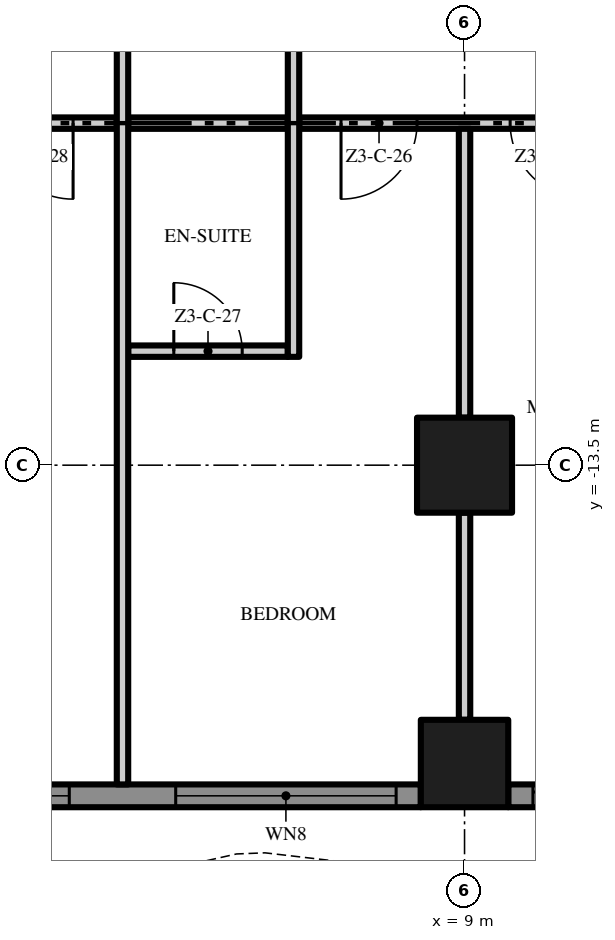
"""IFC4 building model, lengths in metres.
Left out: names, types, materials, properties, quantities, classifications, styles, units other than length and angle.
Written with IfcOpenShell. Run it as: python <this file> out.ifc"""

import sys

from ifc_helpers import new_model, si_unit, direction, frame, frame_2d, origin, origin_2d, place, context, subcontext, project, spatial, polyline, rectangle, outline, extrude, element, fill, save


model = new_model("IFC4")
c1 = context("Model", 3, precision=1e-05, world=origin(), true_north=direction((0.0, 1.0)))
c2 = subcontext(c1, "Body", "Model", "MODEL_VIEW")
j1 = project(units=[si_unit("LENGTHUNIT", "METRE"), si_unit("PLANEANGLEUNIT", "RADIAN")], contexts=[c1])
p1 = place(None, origin())
s1 = spatial("IfcSite", under=j1, at=p1, CompositionType="ELEMENT")
p2 = place(p1, origin())
s2 = spatial("IfcBuilding", under=s1, at=p2, CompositionType="ELEMENT")
p3 = place(p2, frame((0.0, 0.0, 147.8)))
s3 = spatial("IfcBuildingStorey", under=s2, at=p3, CompositionType="ELEMENT", Elevation=147.8)
p4 = place(p3, frame((9.0, -13.5, 0.0), z_axis=(0.0, 0.0, 1.0), x_axis=(1.0, 0.0, 0.0)))
e1 = element("IfcColumn", 1, at=p4, inside=s3, PredefinedType="COLUMN", context=c2, shape_type="SweptSolid", body=[
    extrude(rectangle(XDim=1.25, YDim=1.25, at=origin_2d()), origin(), (0.0, 0.0, 1.0), 3.5),
])
p5 = place(p3, frame((9.0, -17.425, 0.0), z_axis=(0.0, 0.0, 1.0), x_axis=(1.0, 0.0, 0.0)))
e2 = element("IfcColumn", 2, at=p5, inside=s3, PredefinedType="COLUMN", context=c2, shape_type="SweptSolid", body=[
    extrude(rectangle(XDim=1.15, YDim=1.15, at=origin_2d()), origin(), (0.0, 0.0, 1.0), 3.5),
])
p6 = place(p3, frame((8.425, -17.85, 0.0), z_axis=(0.0, 0.0, 1.0), x_axis=(-1.0, 0.0, 0.0)))
e3 = element("IfcWall", 3, at=p6, inside=s3, PredefinedType="SOLIDWALL", context=c2, shape_type="SweptSolid", body=[
    extrude(rectangle(XDim=7.85, YDim=0.3, at=frame_2d((3.925, 0.0))), origin(), (0.0, 0.0, 1.0), 3.5),
])
p7 = place(p6, frame((4.625, 0.0, 0.45)))
e4 = element("IfcOpeningElement", 4, at=p7, cuts=e3, PredefinedType="OPENING", context=c2, shape_type="SweptSolid", body=[
    extrude(rectangle(XDim=2.9, YDim=2.65, at=frame_2d((1.45, 1.325))), frame((0.0, 0.16, 0.0), z_axis=(0.0, -1.0, 0.0), x_axis=(1.0, 0.0, 0.0)), (0.0, 0.0, 1.0), 0.32),
])
p8 = place(p6, frame((0.325, 0.0, 0.45)))
e5 = element("IfcOpeningElement", 5, at=p8, cuts=e3, PredefinedType="OPENING", context=c2, shape_type="SweptSolid", body=[
    extrude(rectangle(XDim=2.9, YDim=2.65, at=frame_2d((1.45, 1.325))), frame((0.0, 0.16, 0.0), z_axis=(0.0, -1.0, 0.0), x_axis=(1.0, 0.0, 0.0)), (0.0, 0.0, 1.0), 0.32),
])
p9 = place(p3, frame((16.85, -17.85, 0.0), z_axis=(0.0, 0.0, 1.0), x_axis=(-1.0, 0.0, 0.0)))
e6 = element("IfcWall", 6, at=p9, inside=s3, PredefinedType="SOLIDWALL", context=c2, shape_type="SweptSolid", body=[
    extrude(rectangle(XDim=7.275, YDim=0.3, at=frame_2d((3.638, 0.0))), origin(), (0.0, 0.0, 1.0), 3.5),
])
p10 = place(p9, frame((4.05, 0.0, 0.0)))
e7 = element("IfcOpeningElement", 7, at=p10, cuts=e6, PredefinedType="OPENING", context=c2, shape_type="SweptSolid", body=[
    extrude(rectangle(XDim=2.9, YDim=2.4, at=frame_2d((1.45, 1.2))), frame((0.0, 0.16, 0.0), z_axis=(0.0, -1.0, 0.0), x_axis=(1.0, 0.0, 0.0)), (0.0, 0.0, 1.0), 0.32),
])
p11 = place(p9, frame((0.3, 0.0, 0.0)))
e8 = element("IfcOpeningElement", 8, at=p11, cuts=e6, PredefinedType="OPENING", context=c2, shape_type="SweptSolid", body=[
    extrude(rectangle(XDim=2.35, YDim=2.4, at=frame_2d((1.175, 1.2))), frame((0.0, 0.16, 0.0), z_axis=(0.0, -1.0, 0.0), x_axis=(1.0, 0.0, 0.0)), (0.0, 0.0, 1.0), 0.32),
])
p12 = place(p3, origin())
e9 = element("IfcWall", 9, at=p12, inside=s3, PredefinedType="USERDEFINED", context=c2, shape_type="SweptSolid", body=[
    extrude(outline(polyline([(-18.0, -20.649), (-16.5, -20.985), (-16.125, -21.0), (-15.0, -20.869), (-13.5, -20.345), (-12.0, -19.612), (-10.5, -18.951), (-9.0, -18.615), (-8.625, -18.6), (-7.5, -18.731), (-6.0, -19.255), (-4.5, -19.988), (-3.0, -20.649), (-1.5, -20.985), (-1.125, -21.0), (0.0, -20.869), (1.5, -20.345), (3.0, -19.612), (4.5, -18.951), (6.0, -18.615), (6.375, -18.6), (7.5, -18.731), (9.0, -19.255), (10.5, -19.988), (12.0, -20.649), (13.5, -20.985), (13.875, -21.0), (15.0, -20.869), (16.5, -20.345), (18.0, -19.612), (17.89, -19.388), (16.404, -20.114), (14.944, -20.624), (13.865, -20.749), (13.533, -20.736), (12.079, -20.41), (10.605, -19.761), (9.096, -19.024), (7.556, -18.486), (6.385, -18.349), (5.967, -18.366), (4.421, -18.713), (2.895, -19.385), (1.404, -20.114), (-0.056, -20.624), (-1.135, -20.749), (-1.467, -20.736), (-2.921, -20.41), (-4.395, -19.761), (-5.904, -19.024), (-7.444, -18.486), (-8.615, -18.349), (-9.033, -18.366), (-10.579, -18.713), (-12.105, -19.385), (-13.596, -20.114), (-15.056, -20.624), (-16.135, -20.749), (-16.467, -20.736), (-17.945, -20.405), (-18.0, -20.649)])), origin(), (0.0, 0.0, 1.0), 0.9),
])
p13 = place(p3, frame((4.575, -12.0, 0.0), z_axis=(0.0, 0.0, 1.0), x_axis=(1.0, 0.0, 0.0)))
e10 = element("IfcWall", 10, at=p13, inside=s3, PredefinedType="PARTITIONING", context=c2, shape_type="SweptSolid", body=[
    extrude(rectangle(XDim=2.1, YDim=0.15, at=frame_2d((1.05, 0.0))), origin(), (0.0, 0.0, 1.0), 3.5),
])
p14 = place(p13, frame((0.6, 0.0, 0.0)))
e11 = element("IfcOpeningElement", 11, at=p14, cuts=e10, PredefinedType="OPENING", context=c2, shape_type="SweptSolid", body=[
    extrude(rectangle(XDim=0.9, YDim=2.1, at=frame_2d((0.45, 1.05))), frame((0.0, 0.085, 0.0), z_axis=(0.0, -1.0, 0.0), x_axis=(1.0, 0.0, 0.0)), (0.0, 0.0, 1.0), 0.17),
])
p15 = place(p3, frame((4.425, -9.0, 0.0), z_axis=(0.0, 0.0, 1.0), x_axis=(-1.0, 0.0, 0.0)))
e12 = element("IfcWall", 12, at=p15, inside=s3, PredefinedType="PARTITIONING", context=c2, shape_type="SweptSolid", body=[
    extrude(rectangle(XDim=4.35, YDim=0.15, at=frame_2d((2.175, 0.0))), origin(), (0.0, 0.0, 1.0), 3.5),
])
p16 = place(p15, frame((0.575, 0.0, 0.0)))
e13 = element("IfcOpeningElement", 13, at=p16, cuts=e12, PredefinedType="OPENING", context=c2, shape_type="SweptSolid", body=[
    extrude(rectangle(XDim=1.0, YDim=2.4, at=frame_2d((0.5, 1.2))), frame((0.0, 0.085, 0.0), z_axis=(0.0, -1.0, 0.0), x_axis=(1.0, 0.0, 0.0)), (0.0, 0.0, 1.0), 0.17),
])
p17 = place(p3, frame((4.575, -9.0, 0.0), z_axis=(0.0, 0.0, 1.0), x_axis=(1.0, 0.0, 0.0)))
e14 = element("IfcWall", 14, at=p17, inside=s3, PredefinedType="PARTITIONING", context=c2, shape_type="SweptSolid", body=[
    extrude(rectangle(XDim=2.1, YDim=0.15, at=frame_2d((1.05, 0.0))), origin(), (0.0, 0.0, 1.0), 3.5),
])
p18 = place(p3, frame((11.175, -9.0, 0.0), z_axis=(0.0, 0.0, 1.0), x_axis=(-1.0, 0.0, 0.0)))
e15 = element("IfcWall", 15, at=p18, inside=s3, PredefinedType="PARTITIONING", context=c2, shape_type="SweptSolid", body=[
    extrude(rectangle(XDim=4.35, YDim=0.15, at=frame_2d((2.175, 0.0))), origin(), (0.0, 0.0, 1.0), 3.5),
])
p19 = place(p18, frame((0.575, 0.0, 0.0)))
e16 = element("IfcOpeningElement", 16, at=p19, cuts=e15, PredefinedType="OPENING", context=c2, shape_type="SweptSolid", body=[
    extrude(rectangle(XDim=1.0, YDim=2.4, at=frame_2d((0.5, 1.2))), frame((0.0, 0.085, 0.0), z_axis=(0.0, -1.0, 0.0), x_axis=(1.0, 0.0, 0.0)), (0.0, 0.0, 1.0), 0.17),
])
p20 = place(p18, frame((2.8, 0.0, 0.0)))
e17 = element("IfcOpeningElement", 17, at=p20, cuts=e15, PredefinedType="OPENING", context=c2, shape_type="SweptSolid", body=[
    extrude(rectangle(XDim=1.0, YDim=2.4, at=frame_2d((0.5, 1.2))), frame((0.0, 0.085, 0.0), z_axis=(0.0, -1.0, 0.0), x_axis=(1.0, 0.0, 0.0)), (0.0, 0.0, 1.0), 0.17),
])
p21 = place(p3, frame((4.5, -17.7, 0.0), z_axis=(0.0, 0.0, 1.0), x_axis=(0.0, 1.0, 0.0)))
e18 = element("IfcWall", 18, at=p21, inside=s3, PredefinedType="PARTITIONING", context=c2, shape_type="SweptSolid", body=[
    extrude(rectangle(XDim=13.275, YDim=0.15, at=frame_2d((6.638, 0.0))), origin(), (0.0, 0.0, 1.0), 3.5),
])
p22 = place(p3, frame((6.75, -12.075, 0.0), z_axis=(0.0, 0.0, 1.0), x_axis=(0.0, 1.0, 0.0)))
e19 = element("IfcWall", 19, at=p22, inside=s3, PredefinedType="PARTITIONING", context=c2, shape_type="SweptSolid", body=[
    extrude(rectangle(XDim=7.65, YDim=0.15, at=frame_2d((3.825, 0.0))), origin(), (0.0, 0.0, 1.0), 3.5),
])
p23 = place(p3, frame((9.0, -16.85, 0.0), z_axis=(0.0, 0.0, 1.0), x_axis=(0.0, 1.0, 0.0)))
e20 = element("IfcWall", 20, at=p23, inside=s3, PredefinedType="PARTITIONING", context=c2, shape_type="SweptSolid", body=[
    extrude(rectangle(XDim=2.725, YDim=0.15, at=frame_2d((1.363, 0.0))), origin(), (0.0, 0.0, 1.0), 3.5),
])
p24 = place(p3, frame((9.0, -12.875, 0.0), z_axis=(0.0, 0.0, 1.0), x_axis=(0.0, 1.0, 0.0)))
e21 = element("IfcWall", 21, at=p24, inside=s3, PredefinedType="PARTITIONING", context=c2, shape_type="SweptSolid", body=[
    extrude(rectangle(XDim=3.8, YDim=0.15, at=frame_2d((1.9, 0.0))), origin(), (0.0, 0.0, 1.0), 3.5),
])
p25 = place(p7, origin())
e22 = element("IfcWindow", 22, at=p25, inside=s3, PartitioningType="SINGLE_PANEL", PredefinedType="WINDOW", context=c2, shape_type="SweptSolid", body=[
    extrude(rectangle(XDim=2.9, YDim=2.65, at=frame_2d((1.45, 1.325))), frame((0.0, 0.03, 0.0), z_axis=(0.0, -1.0, 0.0), x_axis=(1.0, 0.0, 0.0)), (0.0, 0.0, 1.0), 0.06),
])
fill(e4, e22)
p26 = place(p8, origin())
e23 = element("IfcWindow", 23, at=p26, inside=s3, PartitioningType="SINGLE_PANEL", PredefinedType="WINDOW", context=c2, shape_type="SweptSolid", body=[
    extrude(rectangle(XDim=2.9, YDim=2.65, at=frame_2d((1.45, 1.325))), frame((0.0, 0.03, 0.0), z_axis=(0.0, -1.0, 0.0), x_axis=(1.0, 0.0, 0.0)), (0.0, 0.0, 1.0), 0.06),
])
fill(e5, e23)
p27 = place(p10, origin())
e24 = element("IfcDoor", 24, at=p27, inside=s3, OperationType="SINGLE_SWING_LEFT", PredefinedType="DOOR", context=c2, shape_type="SweptSolid", body=[
    extrude(rectangle(XDim=2.9, YDim=2.4, at=frame_2d((1.45, 1.2))), frame((0.0, 0.025, 0.0), z_axis=(0.0, -1.0, 0.0), x_axis=(1.0, 0.0, 0.0)), (0.0, 0.0, 1.0), 0.05),
])
fill(e7, e24)
p28 = place(p19, origin())
e25 = element("IfcDoor", 25, at=p28, inside=s3, OperationType="SINGLE_SWING_LEFT", PredefinedType="DOOR", context=c2, shape_type="SweptSolid", body=[
    extrude(rectangle(XDim=1.0, YDim=2.4, at=frame_2d((0.5, 1.2))), frame((0.0, 0.025, 0.0), z_axis=(0.0, -1.0, 0.0), x_axis=(1.0, 0.0, 0.0)), (0.0, 0.0, 1.0), 0.05),
])
fill(e16, e25)
p29 = place(p20, origin())
e26 = element("IfcDoor", 26, at=p29, inside=s3, OperationType="SINGLE_SWING_RIGHT", PredefinedType="DOOR", context=c2, shape_type="SweptSolid", body=[
    extrude(rectangle(XDim=1.0, YDim=2.4, at=frame_2d((0.5, 1.2))), frame((0.0, 0.025, 0.0), z_axis=(0.0, -1.0, 0.0), x_axis=(1.0, 0.0, 0.0)), (0.0, 0.0, 1.0), 0.05),
])
fill(e17, e26)
p30 = place(p14, origin())
e27 = element("IfcDoor", 27, at=p30, inside=s3, OperationType="SINGLE_SWING_LEFT", PredefinedType="DOOR", context=c2, shape_type="SweptSolid", body=[
    extrude(rectangle(XDim=0.9, YDim=2.1, at=frame_2d((0.45, 1.05))), frame((0.0, 0.025, 0.0), z_axis=(0.0, -1.0, 0.0), x_axis=(1.0, 0.0, 0.0)), (0.0, 0.0, 1.0), 0.05),
])
fill(e11, e27)
p31 = place(p16, origin())
e28 = element("IfcDoor", 28, at=p31, inside=s3, OperationType="SINGLE_SWING_LEFT", PredefinedType="DOOR", context=c2, shape_type="SweptSolid", body=[
    extrude(rectangle(XDim=1.0, YDim=2.4, at=frame_2d((0.5, 1.2))), frame((0.0, 0.025, 0.0), z_axis=(0.0, -1.0, 0.0), x_axis=(1.0, 0.0, 0.0)), (0.0, 0.0, 1.0), 0.05),
])
fill(e13, e28)
save(model, sys.argv[1])
